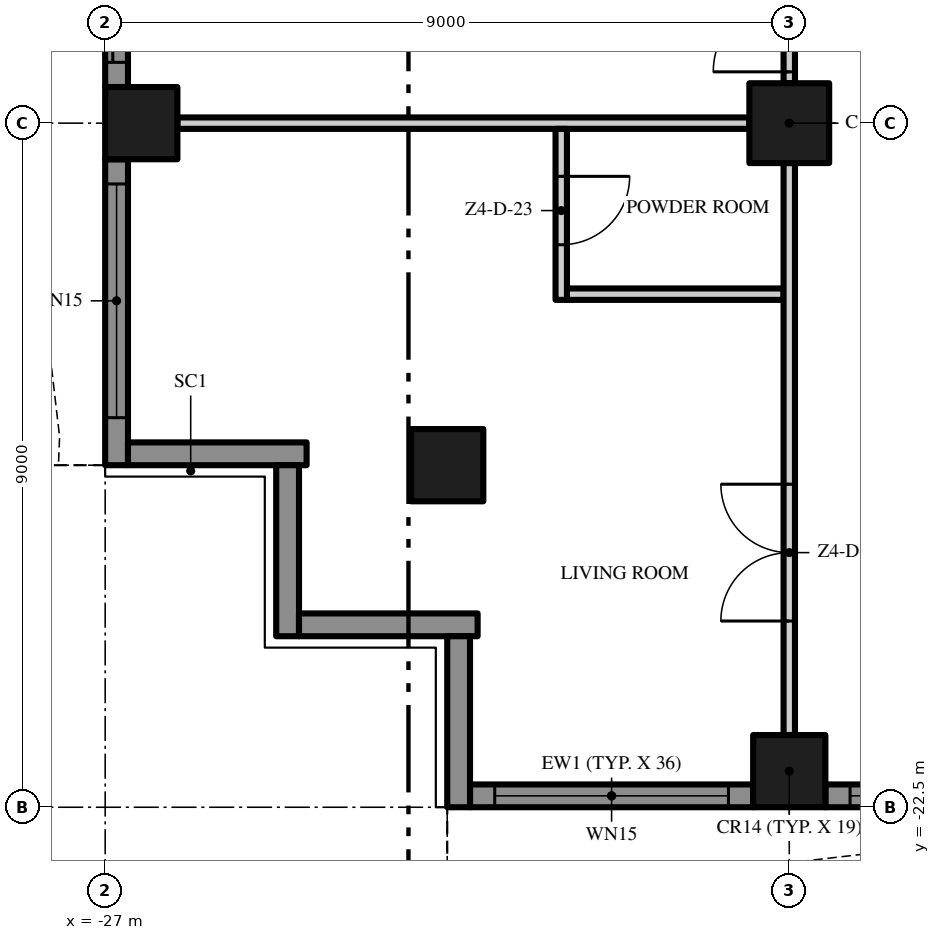
"""IFC4 building model, lengths in metres.
Left out: names, types, materials, properties, quantities, classifications, styles, units other than length and angle.
Written with IfcOpenShell. Run it as: python <this file> out.ifc"""

import sys

from ifc_helpers import new_model, si_unit, direction, frame, frame_2d, origin, origin_2d, place, context, subcontext, project, spatial, polyline, rectangle, outline, extrude, element, fill, save


model = new_model("IFC4")
c1 = context("Model", 3, precision=1e-05, world=origin(), true_north=direction((0.0, 1.0)))
c2 = subcontext(c1, "Body", "Model", "MODEL_VIEW")
j1 = project(units=[si_unit("LENGTHUNIT", "METRE"), si_unit("PLANEANGLEUNIT", "RADIAN")], contexts=[c1])
p1 = place(None, origin())
s1 = spatial("IfcSite", under=j1, at=p1, CompositionType="ELEMENT")
p2 = place(p1, origin())
s2 = spatial("IfcBuilding", under=s1, at=p2, CompositionType="ELEMENT")
p3 = place(p2, frame((0.0, 0.0, 222.4)))
s3 = spatial("IfcBuildingStorey", under=s2, at=p3, CompositionType="ELEMENT", Elevation=222.4)
p4 = place(p3, frame((-18.0, -13.5, 0.0), z_axis=(0.0, 0.0, 1.0), x_axis=(1.0, 0.0, 0.0)))
e1 = element("IfcColumn", 1, at=p4, inside=s3, PredefinedType="COLUMN", context=c2, shape_type="SweptSolid", body=[
    extrude(rectangle(XDim=1.05, YDim=1.05, at=origin_2d()), origin(), (0.0, 0.0, 1.0), 3.5),
])
for number, where, z_axis, x_axis in (
    (2, (-18.0, -22.025, 0.0), (0.0, 0.0, 1.0), (1.0, 0.0, 0.0)),
    (3, (-26.525, -13.5, 0.0), (0.0, 0.0, 1.0), (1.0, 0.0, 0.0)),
    (4, (-22.5, -18.0, 0.0), (0.0, 0.0, 1.0), (1.0, 0.0, 0.0)),
):
    element("IfcColumn", number, at=place(p3, frame(where, z_axis=z_axis, x_axis=x_axis)), inside=s3, PredefinedType="COLUMN", context=c2, shape_type="SweptSolid", body=[
        extrude(rectangle(XDim=0.95, YDim=0.95, at=origin_2d()), origin(), (0.0, 0.0, 1.0), 3.5),
    ])
p5 = place(p3, frame((-18.475, -22.35, 0.0), z_axis=(0.0, 0.0, 1.0), x_axis=(-1.0, 0.0, 0.0)))
e5 = element("IfcWall", 5, at=p5, inside=s3, PredefinedType="SOLIDWALL", context=c2, shape_type="SweptSolid", body=[
    extrude(rectangle(XDim=3.725, YDim=0.3, at=frame_2d((1.863, 0.0))), origin(), (0.0, 0.0, 1.0), 3.5),
])
p6 = place(p5, frame((0.325, 0.0, 0.45)))
e6 = element("IfcOpeningElement", 6, at=p6, cuts=e5, PredefinedType="OPENING", context=c2, shape_type="SweptSolid", body=[
    extrude(rectangle(XDim=3.075, YDim=2.65, at=frame_2d((1.538, 1.325))), frame((0.0, 0.16, 0.0), z_axis=(0.0, -1.0, 0.0), x_axis=(1.0, 0.0, 0.0)), (0.0, 0.0, 1.0), 0.32),
])
p7 = place(p3, frame((-9.475, -22.35, 0.0), z_axis=(0.0, 0.0, 1.0), x_axis=(-1.0, 0.0, 0.0)))
e7 = element("IfcWall", 7, at=p7, inside=s3, PredefinedType="SOLIDWALL", context=c2, shape_type="SweptSolid", body=[
    extrude(rectangle(XDim=8.05, YDim=0.3, at=frame_2d((4.025, 0.0))), origin(), (0.0, 0.0, 1.0), 3.5),
])
p8 = place(p7, frame((4.65, 0.0, 0.45)))
e8 = element("IfcOpeningElement", 8, at=p8, cuts=e7, PredefinedType="OPENING", context=c2, shape_type="SweptSolid", body=[
    extrude(rectangle(XDim=3.075, YDim=2.65, at=frame_2d((1.538, 1.325))), frame((0.0, 0.16, 0.0), z_axis=(0.0, -1.0, 0.0), x_axis=(1.0, 0.0, 0.0)), (0.0, 0.0, 1.0), 0.32),
])
p9 = place(p7, frame((0.325, 0.0, 0.0)))
e9 = element("IfcOpeningElement", 9, at=p9, cuts=e7, PredefinedType="OPENING", context=c2, shape_type="SweptSolid", body=[
    extrude(rectangle(XDim=3.075, YDim=2.4, at=frame_2d((1.538, 1.2))), frame((0.0, 0.16, 0.0), z_axis=(0.0, -1.0, 0.0), x_axis=(1.0, 0.0, 0.0)), (0.0, 0.0, 1.0), 0.32),
])
p10 = place(p3, frame((-26.85, -13.025, 0.0), z_axis=(0.0, 0.0, 1.0), x_axis=(0.0, 1.0, 0.0)))
e10 = element("IfcWall", 10, at=p10, inside=s3, PredefinedType="SOLIDWALL", context=c2, shape_type="SweptSolid", body=[
    extrude(rectangle(XDim=8.05, YDim=0.3, at=frame_2d((4.025, 0.0))), origin(), (0.0, 0.0, 1.0), 3.5),
])
p11 = place(p10, frame((4.65, 0.0, 0.45)))
e11 = element("IfcOpeningElement", 11, at=p11, cuts=e10, PredefinedType="OPENING", context=c2, shape_type="SweptSolid", body=[
    extrude(rectangle(XDim=3.075, YDim=2.65, at=frame_2d((1.538, 1.325))), frame((0.0, 0.16, 0.0), z_axis=(0.0, -1.0, 0.0), x_axis=(1.0, 0.0, 0.0)), (0.0, 0.0, 1.0), 0.32),
])
p12 = place(p10, frame((0.325, 0.0, 0.0)))
e12 = element("IfcOpeningElement", 12, at=p12, cuts=e10, PredefinedType="OPENING", context=c2, shape_type="SweptSolid", body=[
    extrude(rectangle(XDim=3.075, YDim=2.4, at=frame_2d((1.538, 1.2))), frame((0.0, 0.16, 0.0), z_axis=(0.0, -1.0, 0.0), x_axis=(1.0, 0.0, 0.0)), (0.0, 0.0, 1.0), 0.32),
])
p13 = place(p3, frame((-26.85, -18.0, 0.0), z_axis=(0.0, 0.0, 1.0), x_axis=(0.0, 1.0, 0.0)))
e13 = element("IfcWall", 13, at=p13, inside=s3, PredefinedType="SOLIDWALL", context=c2, shape_type="SweptSolid", body=[
    extrude(rectangle(XDim=4.025, YDim=0.3, at=frame_2d((2.013, 0.0))), origin(), (0.0, 0.0, 1.0), 3.5),
])
p14 = place(p13, frame((0.625, 0.0, 0.45)))
e14 = element("IfcOpeningElement", 14, at=p14, cuts=e13, PredefinedType="OPENING", context=c2, shape_type="SweptSolid", body=[
    extrude(rectangle(XDim=3.075, YDim=2.65, at=frame_2d((1.538, 1.325))), frame((0.0, 0.16, 0.0), z_axis=(0.0, -1.0, 0.0), x_axis=(1.0, 0.0, 0.0)), (0.0, 0.0, 1.0), 0.32),
])
p15 = place(p3, frame((-24.35, -17.85, 0.0), z_axis=(0.0, 0.0, 1.0), x_axis=(-1.0, 0.0, 0.0)))
e15 = element("IfcWall", 15, at=p15, inside=s3, PredefinedType="SOLIDWALL", context=c2, shape_type="SweptSolid", body=[
    extrude(rectangle(XDim=2.35, YDim=0.3, at=frame_2d((1.175, 0.0))), origin(), (0.0, 0.0, 1.0), 3.5),
])
p16 = place(p3, frame((-24.6, -20.25, 0.0), z_axis=(0.0, 0.0, 1.0), x_axis=(0.0, 1.0, 0.0)))
e16 = element("IfcWall", 16, at=p16, inside=s3, PredefinedType="SOLIDWALL", context=c2, shape_type="SweptSolid", body=[
    extrude(rectangle(XDim=2.25, YDim=0.3, at=frame_2d((1.125, 0.0))), origin(), (0.0, 0.0, 1.0), 3.5),
])
p17 = place(p3, frame((-22.1, -20.1, 0.0), z_axis=(0.0, 0.0, 1.0), x_axis=(-1.0, 0.0, 0.0)))
e17 = element("IfcWall", 17, at=p17, inside=s3, PredefinedType="SOLIDWALL", context=c2, shape_type="SweptSolid", body=[
    extrude(rectangle(XDim=2.35, YDim=0.3, at=frame_2d((1.175, 0.0))), origin(), (0.0, 0.0, 1.0), 3.5),
])
p18 = place(p3, frame((-22.35, -22.5, 0.0), z_axis=(0.0, 0.0, 1.0), x_axis=(0.0, 1.0, 0.0)))
e18 = element("IfcWall", 18, at=p18, inside=s3, PredefinedType="SOLIDWALL", context=c2, shape_type="SweptSolid", body=[
    extrude(rectangle(XDim=2.25, YDim=0.3, at=frame_2d((1.125, 0.0))), origin(), (0.0, 0.0, 1.0), 3.5),
])
p19 = place(p3, origin())
e19 = element("IfcWall", 19, at=p19, inside=s3, PredefinedType="USERDEFINED", context=c2, shape_type="SweptSolid", body=[
    extrude(outline(polyline([(-22.5, -25.149), (-21.0, -24.488), (-19.5, -23.755), (-18.0, -23.231), (-16.875, -23.1), (-16.5, -23.115), (-15.0, -23.451), (-13.5, -24.112), (-12.0, -24.845), (-10.5, -25.369), (-9.375, -25.5), (-9.0, -25.485), (-7.5, -25.149), (-6.0, -24.488), (-4.5, -23.755), (-3.0, -23.231), (-1.875, -23.1), (-1.5, -23.115), (0.0, -23.451), (1.5, -24.112), (3.0, -24.845), (4.5, -25.369), (5.625, -25.5), (6.0, -25.485), (7.5, -25.149), (9.0, -24.488), (10.5, -23.755), (12.0, -23.231), (13.125, -23.1), (13.5, -23.115), (15.0, -23.451), (16.5, -24.112), (18.0, -24.845), (19.5, -25.369), (20.625, -25.5), (21.0, -25.485), (22.5, -25.149), (22.445, -24.905), (20.967, -25.236), (20.635, -25.249), (19.556, -25.124), (18.096, -24.614), (16.605, -23.885), (15.079, -23.213), (13.533, -22.866), (13.115, -22.849), (11.944, -22.986), (10.404, -23.524), (8.895, -24.261), (7.421, -24.91), (5.967, -25.236), (5.635, -25.249), (4.556, -25.124), (3.096, -24.614), (1.605, -23.885), (0.079, -23.213), (-1.467, -22.866), (-1.885, -22.849), (-3.056, -22.986), (-4.596, -23.524), (-6.105, -24.261), (-7.579, -24.91), (-9.033, -25.236), (-9.365, -25.249), (-10.444, -25.124), (-11.904, -24.614), (-13.395, -23.885), (-14.921, -23.213), (-16.467, -22.866), (-16.885, -22.849), (-18.056, -22.986), (-19.596, -23.524), (-21.105, -24.261), (-22.601, -24.92), (-22.5, -25.149)])), origin(), (0.0, 0.0, 1.0), 0.9),
])
p20 = place(p3, origin())
e20 = element("IfcWall", 20, at=p20, inside=s3, PredefinedType="USERDEFINED", context=c2, shape_type="SweptSolid", body=[
    extrude(outline(polyline([(-29.649, 18.0), (-28.988, 16.5), (-28.255, 15.0), (-27.731, 13.5), (-27.6, 12.375), (-27.615, 12.0), (-27.951, 10.5), (-28.612, 9.0), (-29.345, 7.5), (-29.869, 6.0), (-30.0, 4.875), (-29.985, 4.5), (-29.649, 3.0), (-28.988, 1.5), (-28.255, 0.0), (-27.731, -1.5), (-27.6, -2.625), (-27.615, -3.0), (-27.951, -4.5), (-28.612, -6.0), (-29.345, -7.5), (-29.869, -9.0), (-30.0, -10.125), (-29.985, -10.5), (-29.649, -12.0), (-28.988, -13.5), (-28.255, -15.0), (-27.731, -16.5), (-27.6, -17.625), (-27.615, -18.0), (-27.365, -18.01), (-27.349, -17.615), (-27.486, -16.444), (-28.024, -14.904), (-28.761, -13.395), (-29.41, -11.921), (-29.736, -10.467), (-29.749, -10.135), (-29.624, -9.056), (-29.114, -7.596), (-28.385, -6.105), (-27.713, -4.579), (-27.366, -3.033), (-27.349, -2.615), (-27.486, -1.444), (-28.024, 0.096), (-28.761, 1.605), (-29.41, 3.079), (-29.736, 4.533), (-29.749, 4.865), (-29.624, 5.944), (-29.114, 7.404), (-28.385, 8.895), (-27.713, 10.421), (-27.366, 11.967), (-27.349, 12.385), (-27.486, 13.556), (-28.024, 15.096), (-28.761, 16.605), (-29.42, 18.101), (-29.649, 18.0)])), origin(), (0.0, 0.0, 1.0), 0.9),
])
p21 = place(p3, frame((-20.925, -15.75, 0.0), z_axis=(0.0, 0.0, 1.0), x_axis=(1.0, 0.0, 0.0)))
e21 = element("IfcWall", 21, at=p21, inside=s3, PredefinedType="PARTITIONING", context=c2, shape_type="SweptSolid", body=[
    extrude(rectangle(XDim=2.85, YDim=0.15, at=frame_2d((1.425, 0.0))), origin(), (0.0, 0.0, 1.0), 3.5),
])
p22 = place(p3, frame((-26.05, -13.5, 0.0), z_axis=(0.0, 0.0, 1.0), x_axis=(1.0, 0.0, 0.0)))
e22 = element("IfcWall", 22, at=p22, inside=s3, PredefinedType="PARTITIONING", context=c2, shape_type="SweptSolid", body=[
    extrude(rectangle(XDim=7.525, YDim=0.15, at=frame_2d((3.763, 0.0))), origin(), (0.0, 0.0, 1.0), 3.5),
])
p23 = place(p3, frame((-21.0, -13.575, 0.0), z_axis=(0.0, 0.0, 1.0), x_axis=(0.0, -1.0, 0.0)))
e23 = element("IfcWall", 23, at=p23, inside=s3, PredefinedType="PARTITIONING", context=c2, shape_type="SweptSolid", body=[
    extrude(rectangle(XDim=2.25, YDim=0.15, at=frame_2d((1.125, 0.0))), origin(), (0.0, 0.0, 1.0), 3.5),
])
p24 = place(p23, frame((0.625, 0.0, 0.0)))
e24 = element("IfcOpeningElement", 24, at=p24, cuts=e23, PredefinedType="OPENING", context=c2, shape_type="SweptSolid", body=[
    extrude(rectangle(XDim=0.9, YDim=2.1, at=frame_2d((0.45, 1.05))), frame((0.0, 0.085, 0.0), z_axis=(0.0, -1.0, 0.0), x_axis=(1.0, 0.0, 0.0)), (0.0, 0.0, 1.0), 0.17),
])
p25 = place(p3, frame((-18.0, -21.55, 0.0), z_axis=(0.0, 0.0, 1.0), x_axis=(0.0, 1.0, 0.0)))
e25 = element("IfcWall", 25, at=p25, inside=s3, PredefinedType="PARTITIONING", context=c2, shape_type="SweptSolid", body=[
    extrude(rectangle(XDim=7.525, YDim=0.15, at=frame_2d((3.763, 0.0))), origin(), (0.0, 0.0, 1.0), 3.5),
])
p26 = place(p25, frame((1.5, 0.0, 0.0)))
e26 = element("IfcOpeningElement", 26, at=p26, cuts=e25, PredefinedType="OPENING", context=c2, shape_type="SweptSolid", body=[
    extrude(rectangle(XDim=1.8, YDim=2.4, at=frame_2d((0.9, 1.2))), frame((0.0, 0.085, 0.0), z_axis=(0.0, -1.0, 0.0), x_axis=(1.0, 0.0, 0.0)), (0.0, 0.0, 1.0), 0.17),
])
p27 = place(p3, frame((-18.0, -12.975, 0.0), z_axis=(0.0, 0.0, 1.0), x_axis=(0.0, 1.0, 0.0)))
e27 = element("IfcWall", 27, at=p27, inside=s3, PredefinedType="PARTITIONING", context=c2, shape_type="SweptSolid", body=[
    extrude(rectangle(XDim=7.95, YDim=0.15, at=frame_2d((3.975, 0.0))), origin(), (0.0, 0.0, 1.0), 3.5),
])
p28 = place(p27, frame((0.15, 0.0, 0.0)))
e28 = element("IfcOpeningElement", 28, at=p28, cuts=e27, PredefinedType="OPENING", context=c2, shape_type="SweptSolid", body=[
    extrude(rectangle(XDim=1.0, YDim=2.4, at=frame_2d((0.5, 1.2))), frame((0.0, 0.085, 0.0), z_axis=(0.0, -1.0, 0.0), x_axis=(1.0, 0.0, 0.0)), (0.0, 0.0, 1.0), 0.17),
])
p29 = place(p27, frame((6.8, 0.0, 0.0)))
e29 = element("IfcOpeningElement", 29, at=p29, cuts=e27, PredefinedType="OPENING", context=c2, shape_type="SweptSolid", body=[
    extrude(rectangle(XDim=1.0, YDim=2.4, at=frame_2d((0.5, 1.2))), frame((0.0, 0.085, 0.0), z_axis=(0.0, -1.0, 0.0), x_axis=(1.0, 0.0, 0.0)), (0.0, 0.0, 1.0), 0.17),
])
p30 = place(p6, origin())
e30 = element("IfcWindow", 30, at=p30, inside=s3, PartitioningType="SINGLE_PANEL", PredefinedType="WINDOW", context=c2, shape_type="SweptSolid", body=[
    extrude(rectangle(XDim=3.075, YDim=2.65, at=frame_2d((1.538, 1.325))), frame((0.0, 0.03, 0.0), z_axis=(0.0, -1.0, 0.0), x_axis=(1.0, 0.0, 0.0)), (0.0, 0.0, 1.0), 0.06),
])
fill(e6, e30)
p31 = place(p8, origin())
e31 = element("IfcWindow", 31, at=p31, inside=s3, PartitioningType="SINGLE_PANEL", PredefinedType="WINDOW", context=c2, shape_type="SweptSolid", body=[
    extrude(rectangle(XDim=3.075, YDim=2.65, at=frame_2d((1.538, 1.325))), frame((0.0, 0.03, 0.0), z_axis=(0.0, -1.0, 0.0), x_axis=(1.0, 0.0, 0.0)), (0.0, 0.0, 1.0), 0.06),
])
fill(e8, e31)
p32 = place(p12, origin())
e32 = element("IfcDoor", 32, at=p32, inside=s3, OperationType="SINGLE_SWING_LEFT", PredefinedType="DOOR", context=c2, shape_type="SweptSolid", body=[
    extrude(rectangle(XDim=3.075, YDim=2.4, at=frame_2d((1.538, 1.2))), frame((0.0, 0.025, 0.0), z_axis=(0.0, -1.0, 0.0), x_axis=(1.0, 0.0, 0.0)), (0.0, 0.0, 1.0), 0.05),
])
fill(e12, e32)
p33 = place(p14, origin())
e33 = element("IfcWindow", 33, at=p33, inside=s3, PartitioningType="SINGLE_PANEL", PredefinedType="WINDOW", context=c2, shape_type="SweptSolid", body=[
    extrude(rectangle(XDim=3.075, YDim=2.65, at=frame_2d((1.538, 1.325))), frame((0.0, 0.03, 0.0), z_axis=(0.0, -1.0, 0.0), x_axis=(1.0, 0.0, 0.0)), (0.0, 0.0, 1.0), 0.06),
])
fill(e14, e33)
p34 = place(p26, origin())
e34 = element("IfcDoor", 34, at=p34, inside=s3, OperationType="DOUBLE_DOOR_SINGLE_SWING", PredefinedType="DOOR", context=c2, shape_type="SweptSolid", body=[
    extrude(rectangle(XDim=1.8, YDim=2.4, at=frame_2d((0.9, 1.2))), frame((0.0, 0.025, 0.0), z_axis=(0.0, -1.0, 0.0), x_axis=(1.0, 0.0, 0.0)), (0.0, 0.0, 1.0), 0.05),
])
fill(e26, e34)
p35 = place(p24, origin())
e35 = element("IfcDoor", 35, at=p35, inside=s3, OperationType="SINGLE_SWING_LEFT", PredefinedType="DOOR", context=c2, shape_type="SweptSolid", body=[
    extrude(rectangle(XDim=0.9, YDim=2.1, at=frame_2d((0.45, 1.05))), frame((0.0, 0.025, 0.0), z_axis=(0.0, -1.0, 0.0), x_axis=(1.0, 0.0, 0.0)), (0.0, 0.0, 1.0), 0.05),
])
fill(e24, e35)
p36 = place(p28, origin())
e36 = element("IfcDoor", 36, at=p36, inside=s3, OperationType="SINGLE_SWING_LEFT", PredefinedType="DOOR", context=c2, shape_type="SweptSolid", body=[
    extrude(rectangle(XDim=1.0, YDim=2.4, at=frame_2d((0.5, 1.2))), frame((0.0, 0.025, 0.0), z_axis=(0.0, -1.0, 0.0), x_axis=(1.0, 0.0, 0.0)), (0.0, 0.0, 1.0), 0.05),
])
fill(e28, e36)
save(model, sys.argv[1])
